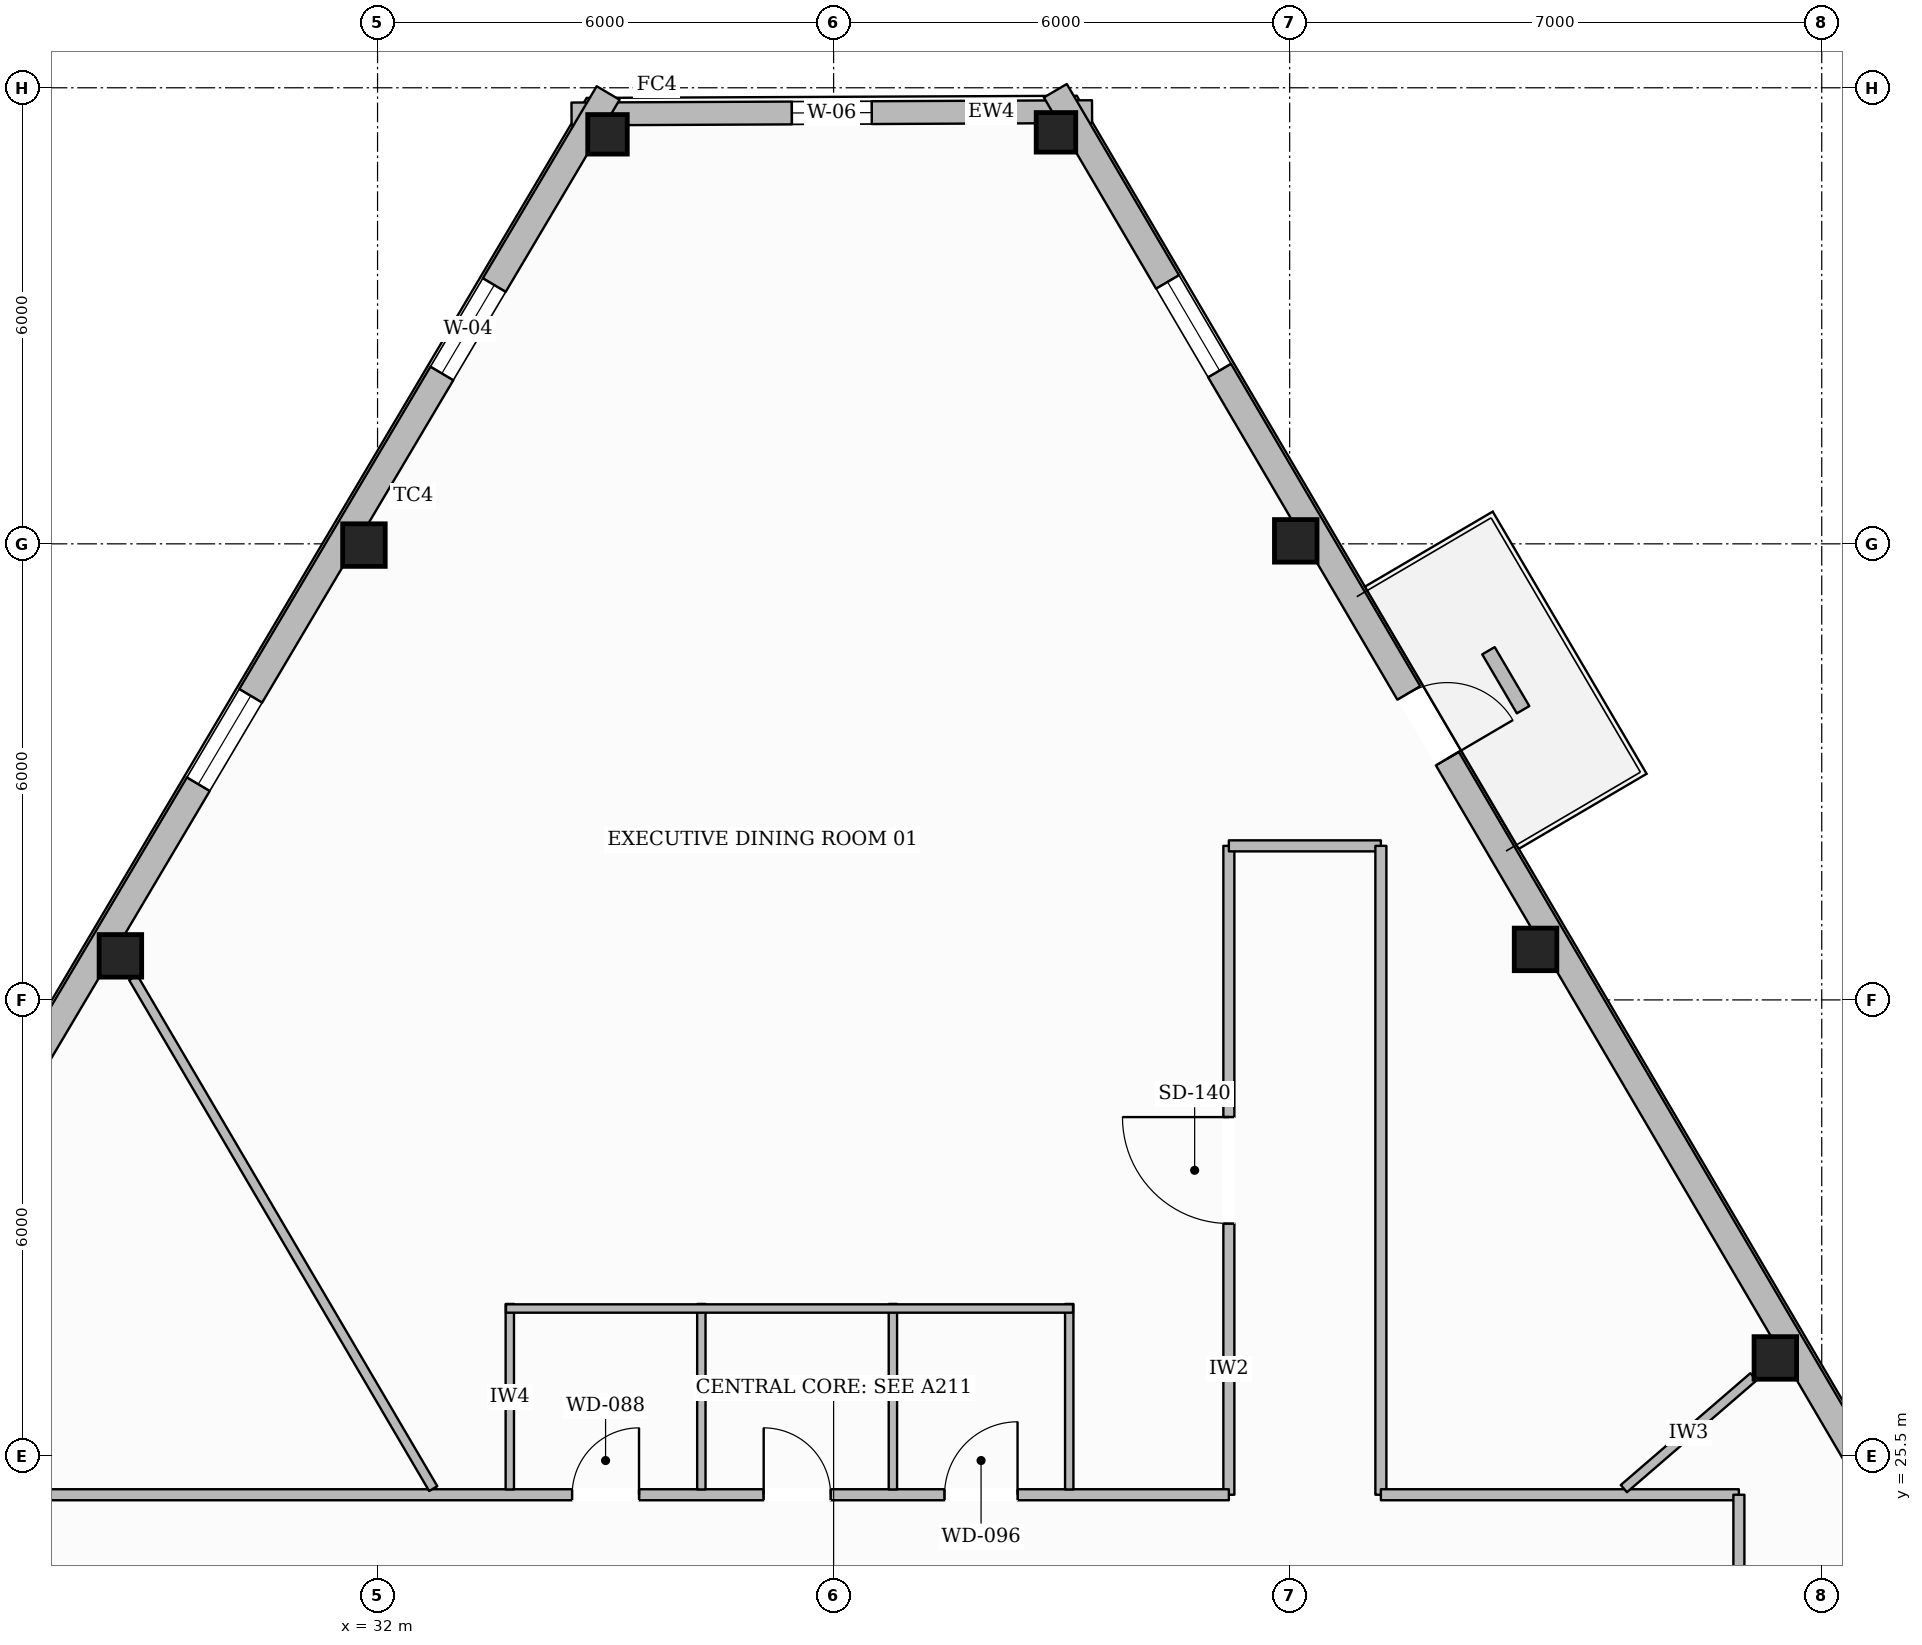
"""IFC4 building model, lengths in metres.
Left out: names, types, materials, properties, quantities, classifications, styles, units other than length and angle.
Written with IfcOpenShell. Run it as: python <this file> out.ifc"""

import sys

from ifc_helpers import new_model, si_unit, direction, frame, frame_2d, origin, origin_2d, place, context, subcontext, project, spatial, rectangle, hollow_rectangle, extrude, element, fill, save


model = new_model("IFC4")
c1 = context("Model", 3, precision=1e-05, world=origin(), true_north=direction((0.0, 1.0)))
c2 = subcontext(c1, "Body", "Model", "MODEL_VIEW")
j1 = project(units=[si_unit("LENGTHUNIT", "METRE"), si_unit("PLANEANGLEUNIT", "RADIAN")], contexts=[c1])
p1 = place(None, origin())
s1 = spatial("IfcSite", under=j1, at=p1, CompositionType="ELEMENT")
p2 = place(p1, origin())
s2 = spatial("IfcBuilding", under=s1, at=p2, CompositionType="ELEMENT")
p3 = place(p2, frame((0.0, 0.0, 278.0)))
s3 = spatial("IfcBuildingStorey", under=s2, at=p3, CompositionType="ELEMENT", Elevation=278.0)
p4 = place(p3, frame((35.025, 42.888, 0.0), z_axis=(0.0, 0.0, 1.0), x_axis=(1.0, 0.0, 0.0)))
e1 = element("IfcColumn", 1, at=p4, inside=s3, PredefinedType="COLUMN", context=c2, shape_type="SweptSolid", body=[
    extrude(hollow_rectangle(XDim=0.52, YDim=0.52, WallThickness=0.024, at=origin_2d()), origin(), (0.0, 0.0, 1.0), 3.61),
])
for number, where, z_axis, x_axis in (
    (2, (31.821, 37.484, 0.0), (0.0, 0.0, 1.0), (1.0, 0.0, 0.0)),
    (3, (28.617, 32.08, 0.0), (0.0, 0.0, 1.0), (1.0, 0.0, 0.0)),
    (4, (50.389, 26.79, 0.0), (0.0, 0.0, 1.0), (1.0, 0.0, 0.0)),
    (5, (47.235, 32.164, 0.0), (0.0, 0.0, 1.0), (1.0, 0.0, 0.0)),
    (6, (44.08, 37.539, 0.0), (0.0, 0.0, 1.0), (1.0, 0.0, 0.0)),
):
    element("IfcColumn", number, at=place(p3, frame(where, z_axis=z_axis, x_axis=x_axis)), inside=s3, PredefinedType="COLUMN", context=c2, shape_type="SweptSolid", body=[
        extrude(hollow_rectangle(XDim=0.56, YDim=0.56, WallThickness=0.025, at=origin_2d()), origin(), (0.0, 0.0, 1.0), 3.61),
    ])
p5 = place(p3, frame((40.925, 42.914, 0.0), z_axis=(0.0, 0.0, 1.0), x_axis=(1.0, 0.0, 0.0)))
e7 = element("IfcColumn", 7, at=p5, inside=s3, PredefinedType="COLUMN", context=c2, shape_type="SweptSolid", body=[
    extrude(hollow_rectangle(XDim=0.52, YDim=0.52, WallThickness=0.024, at=origin_2d()), origin(), (0.0, 0.0, 1.0), 3.61),
])
p6 = place(p3, frame((34.552, 43.156, 0.0), z_axis=(0.0, 0.0, 1.0), x_axis=(0.999990229646, 0.004420476578, 0.0)))
e8 = element("IfcWall", 8, at=p6, inside=s3, PredefinedType="STANDARD", context=c2, shape_type="SweptSolid", body=[
    extrude(rectangle(XDim=6.848, YDim=0.3, at=frame_2d((3.424, 0.0))), origin(), (0.0, 0.0, 1.0), 3.196),
])
p7 = place(p6, frame((2.899, 0.0, 0.65)))
e9 = element("IfcOpeningElement", 9, at=p7, cuts=e8, PredefinedType="OPENING", context=c2, shape_type="SweptSolid", body=[
    extrude(rectangle(XDim=1.05, YDim=1.7, at=frame_2d((0.525, 0.85))), frame((0.0, 0.16, 0.0), z_axis=(0.0, -1.0, 0.0), x_axis=(1.0, 0.0, 0.0)), (0.0, 0.0, 1.0), 0.32),
])
p8 = place(p3, frame((15.322, 10.186, 0.0), z_axis=(0.0, 0.0, 1.0), x_axis=(0.510014133956, 0.860166020699, 0.0)))
e10 = element("IfcWall", 10, at=p8, inside=s3, PredefinedType="STANDARD", context=c2, shape_type="SweptSolid", body=[
    extrude(rectangle(XDim=38.65, YDim=0.35, at=frame_2d((19.325, 0.0))), origin(), (0.0, 0.0, 1.0), 3.196),
])
p9 = place(p8, frame((34.362, 0.0, 0.65)))
e11 = element("IfcOpeningElement", 11, at=p9, cuts=e10, PredefinedType="OPENING", context=c2, shape_type="SweptSolid", body=[
    extrude(rectangle(XDim=1.35, YDim=1.75, at=frame_2d((0.675, 0.875))), frame((0.0, 0.185, 0.0), z_axis=(0.0, -1.0, 0.0), x_axis=(1.0, 0.0, 0.0)), (0.0, 0.0, 1.0), 0.37),
])
p10 = place(p8, frame((28.08, 0.0, 0.65)))
e12 = element("IfcOpeningElement", 12, at=p10, cuts=e10, PredefinedType="OPENING", context=c2, shape_type="SweptSolid", body=[
    extrude(rectangle(XDim=1.35, YDim=1.75, at=frame_2d((0.675, 0.875))), frame((0.0, 0.185, 0.0), z_axis=(0.0, -1.0, 0.0), x_axis=(1.0, 0.0, 0.0)), (0.0, 0.0, 1.0), 0.37),
])
p11 = place(p8, frame((21.797, 0.0, 0.65)))
e13 = element("IfcOpeningElement", 13, at=p11, cuts=e10, PredefinedType="OPENING", context=c2, shape_type="SweptSolid", body=[
    extrude(rectangle(XDim=1.35, YDim=1.75, at=frame_2d((0.675, 0.875))), frame((0.0, 0.185, 0.0), z_axis=(0.0, -1.0, 0.0), x_axis=(1.0, 0.0, 0.0)), (0.0, 0.0, 1.0), 0.37),
])
p12 = place(p8, frame((9.232, 0.0, 0.65)))
e14 = element("IfcOpeningElement", 14, at=p12, cuts=e10, PredefinedType="OPENING", context=c2, shape_type="SweptSolid", body=[
    extrude(rectangle(XDim=1.35, YDim=1.75, at=frame_2d((0.675, 0.875))), frame((0.0, 0.185, 0.0), z_axis=(0.0, -1.0, 0.0), x_axis=(1.0, 0.0, 0.0)), (0.0, 0.0, 1.0), 0.37),
])
p13 = place(p8, frame((2.949, 0.0, 0.65)))
e15 = element("IfcOpeningElement", 15, at=p13, cuts=e10, PredefinedType="OPENING", context=c2, shape_type="SweptSolid", body=[
    extrude(rectangle(XDim=1.35, YDim=1.75, at=frame_2d((0.675, 0.875))), frame((0.0, 0.185, 0.0), z_axis=(0.0, -1.0, 0.0), x_axis=(1.0, 0.0, 0.0)), (0.0, 0.0, 1.0), 0.37),
])
p14 = place(p3, frame((40.917, 43.461, 0.0), z_axis=(0.0, 0.0, 1.0), x_axis=(0.506204788728, -0.862413306872, 0.0)))
e16 = element("IfcWall", 16, at=p14, inside=s3, PredefinedType="STANDARD", context=c2, shape_type="SweptSolid", body=[
    extrude(rectangle(XDim=38.352, YDim=0.35, at=frame_2d((19.176, 0.0))), origin(), (0.0, 0.0, 1.0), 3.196),
])
p15 = place(p14, frame((9.188, 0.0, 0.0)))
e17 = element("IfcOpeningElement", 17, at=p15, cuts=e16, PredefinedType="OPENING", context=c2, shape_type="SweptSolid", body=[
    extrude(rectangle(XDim=1.0, YDim=2.2, at=frame_2d((0.5, 1.1))), frame((0.0, 0.185, 0.0), z_axis=(0.0, -1.0, 0.0), x_axis=(1.0, 0.0, 0.0)), (0.0, 0.0, 1.0), 0.37),
])
p16 = place(p14, frame((34.078, 0.0, 0.65)))
e18 = element("IfcOpeningElement", 18, at=p16, cuts=e16, PredefinedType="OPENING", context=c2, shape_type="SweptSolid", body=[
    extrude(rectangle(XDim=1.35, YDim=1.75, at=frame_2d((0.675, 0.875))), frame((0.0, 0.185, 0.0), z_axis=(0.0, -1.0, 0.0), x_axis=(1.0, 0.0, 0.0)), (0.0, 0.0, 1.0), 0.37),
])
p17 = place(p14, frame((27.846, 0.0, 0.65)))
e19 = element("IfcOpeningElement", 19, at=p17, cuts=e16, PredefinedType="OPENING", context=c2, shape_type="SweptSolid", body=[
    extrude(rectangle(XDim=1.35, YDim=1.75, at=frame_2d((0.675, 0.875))), frame((0.0, 0.185, 0.0), z_axis=(0.0, -1.0, 0.0), x_axis=(1.0, 0.0, 0.0)), (0.0, 0.0, 1.0), 0.37),
])
p18 = place(p14, frame((21.614, 0.0, 0.65)))
e20 = element("IfcOpeningElement", 20, at=p18, cuts=e16, PredefinedType="OPENING", context=c2, shape_type="SweptSolid", body=[
    extrude(rectangle(XDim=1.35, YDim=1.75, at=frame_2d((0.675, 0.875))), frame((0.0, 0.185, 0.0), z_axis=(0.0, -1.0, 0.0), x_axis=(1.0, 0.0, 0.0)), (0.0, 0.0, 1.0), 0.37),
])
p19 = place(p14, frame((2.917, 0.0, 0.65)))
e21 = element("IfcOpeningElement", 21, at=p19, cuts=e16, PredefinedType="OPENING", context=c2, shape_type="SweptSolid", body=[
    extrude(rectangle(XDim=1.35, YDim=1.75, at=frame_2d((0.675, 0.875))), frame((0.0, 0.185, 0.0), z_axis=(0.0, -1.0, 0.0), x_axis=(1.0, 0.0, 0.0)), (0.0, 0.0, 1.0), 0.37),
])
p20 = place(p3, frame((47.071, 35.318, 0.0), z_axis=(0.0, 0.0, 1.0), x_axis=(-0.506011920069, 0.862526484665, 0.0)))
e22 = element("IfcWall", 22, at=p20, inside=s3, PredefinedType="USERDEFINED", context=c2, shape_type="SweptSolid", body=[
    extrude(rectangle(XDim=0.9, YDim=0.19, at=frame_2d((0.45, 0.0))), origin(), (0.0, 0.0, 1.0), 0.5),
])
p21 = place(p3, frame((43.2, 24.99, 0.0), z_axis=(0.0, 0.0, 1.0), x_axis=(0.0, 1.0, 0.0)))
e23 = element("IfcWall", 23, at=p21, inside=s3, PredefinedType="PARTITIONING", context=c2, shape_type="SweptSolid", body=[
    extrude(rectangle(XDim=8.537, YDim=0.145, at=frame_2d((4.268, 0.0))), origin(), (0.0, 0.0, 1.0), 3.61),
])
p22 = place(p21, frame((3.568, 0.0, 0.0)))
e24 = element("IfcOpeningElement", 24, at=p22, cuts=e23, PredefinedType="OPENING", context=c2, shape_type="SweptSolid", body=[
    extrude(rectangle(XDim=1.4, YDim=2.2, at=frame_2d((0.7, 1.1))), frame((0.0, 0.083, 0.0), z_axis=(0.0, -1.0, 0.0), x_axis=(1.0, 0.0, 0.0)), (0.0, 0.0, 1.0), 0.165),
])
p23 = place(p3, frame((43.2, 33.527, 0.0), z_axis=(0.0, 0.0, 1.0), x_axis=(1.0, 0.0, 0.0)))
e25 = element("IfcWall", 25, at=p23, inside=s3, PredefinedType="PARTITIONING", context=c2, shape_type="SweptSolid", body=[
    extrude(rectangle(XDim=2.0, YDim=0.145, at=frame_2d((1.0, 0.0))), origin(), (0.0, 0.0, 1.0), 3.61),
])
p24 = place(p3, frame((45.2, 33.527, 0.0), z_axis=(0.0, 0.0, 1.0), x_axis=(0.0, -1.0, 0.0)))
e26 = element("IfcWall", 26, at=p24, inside=s3, PredefinedType="PARTITIONING", context=c2, shape_type="SweptSolid", body=[
    extrude(rectangle(XDim=8.537, YDim=0.145, at=frame_2d((4.268, 0.0))), origin(), (0.0, 0.0, 1.0), 3.61),
])
p25 = place(p3, frame((45.2, 24.99, 0.0), z_axis=(0.0, 0.0, 1.0), x_axis=(1.0, 0.0, 0.0)))
e27 = element("IfcWall", 27, at=p25, inside=s3, PredefinedType="PARTITIONING", context=c2, shape_type="SweptSolid", body=[
    extrude(rectangle(XDim=4.71, YDim=0.145, at=frame_2d((2.355, 0.0))), origin(), (0.0, 0.0, 1.0), 3.61),
])
p26 = place(p3, frame((49.91, 24.99, 0.0), z_axis=(0.0, 0.0, 1.0), x_axis=(0.0, -1.0, 0.0)))
e28 = element("IfcWall", 28, at=p26, inside=s3, PredefinedType="PARTITIONING", context=c2, shape_type="SweptSolid", body=[
    extrude(rectangle(XDim=7.34, YDim=0.145, at=frame_2d((3.67, 0.0))), origin(), (0.0, 0.0, 1.0), 3.349),
])
p27 = place(p26, frame((2.97, 0.0, 0.0)))
e29 = element("IfcOpeningElement", 29, at=p27, cuts=e28, PredefinedType="OPENING", context=c2, shape_type="SweptSolid", body=[
    extrude(rectangle(XDim=1.4, YDim=2.2, at=frame_2d((0.7, 1.1))), frame((0.0, 0.083, 0.0), z_axis=(0.0, -1.0, 0.0), x_axis=(1.0, 0.0, 0.0)), (0.0, 0.0, 1.0), 0.165),
])
p28 = place(p3, frame((26.09, 24.99, 0.0), z_axis=(0.0, 0.0, 1.0), x_axis=(1.0, 0.0, 0.0)))
e30 = element("IfcWall", 30, at=p28, inside=s3, PredefinedType="PARTITIONING", context=c2, shape_type="SweptSolid", body=[
    extrude(rectangle(XDim=17.11, YDim=0.145, at=frame_2d((8.555, 0.0))), origin(), (0.0, 0.0, 1.0), 3.61),
])
p29 = place(p28, frame((8.47, 0.0, 0.0)))
e31 = element("IfcOpeningElement", 31, at=p29, cuts=e30, PredefinedType="OPENING", context=c2, shape_type="SweptSolid", body=[
    extrude(rectangle(XDim=0.88, YDim=2.1, at=frame_2d((0.44, 1.05))), frame((0.0, 0.083, 0.0), z_axis=(0.0, -1.0, 0.0), x_axis=(1.0, 0.0, 0.0)), (0.0, 0.0, 1.0), 0.165),
])
p30 = place(p28, frame((10.99, 0.0, 0.0)))
e32 = element("IfcOpeningElement", 32, at=p30, cuts=e30, PredefinedType="OPENING", context=c2, shape_type="SweptSolid", body=[
    extrude(rectangle(XDim=0.88, YDim=2.1, at=frame_2d((0.44, 1.05))), frame((0.0, 0.083, 0.0), z_axis=(0.0, -1.0, 0.0), x_axis=(1.0, 0.0, 0.0)), (0.0, 0.0, 1.0), 0.165),
])
p31 = place(p28, frame((13.37, 0.0, 0.0)))
e33 = element("IfcOpeningElement", 33, at=p31, cuts=e30, PredefinedType="OPENING", context=c2, shape_type="SweptSolid", body=[
    extrude(rectangle(XDim=0.96, YDim=2.1, at=frame_2d((0.48, 1.05))), frame((0.0, 0.083, 0.0), z_axis=(0.0, -1.0, 0.0), x_axis=(1.0, 0.0, 0.0)), (0.0, 0.0, 1.0), 0.165),
])
for number, where, z_axis, x_axis in (
    (34, (33.74, 25.06, 0.0), (0.0, 0.0, 1.0), (0.0, 1.0, 0.0)),
    (35, (36.26, 25.06, 0.0), (0.0, 0.0, 1.0), (0.0, 1.0, 0.0)),
    (36, (38.78, 25.06, 0.0), (0.0, 0.0, 1.0), (0.0, 1.0, 0.0)),
    (37, (41.1, 25.06, 0.0), (0.0, 0.0, 1.0), (0.0, 1.0, 0.0)),
):
    element("IfcWall", number, at=place(p3, frame(where, z_axis=z_axis, x_axis=x_axis)), inside=s3, PredefinedType="PLUMBINGWALL", context=c2, shape_type="SweptSolid", body=[
        extrude(rectangle(XDim=2.44, YDim=0.11, at=frame_2d((1.22, 0.0))), origin(), (0.0, 0.0, 1.0), 3.61),
    ])
p32 = place(p3, frame((33.69, 27.44, 0.0), z_axis=(0.0, 0.0, 1.0), x_axis=(1.0, 0.0, 0.0)))
e38 = element("IfcWall", 38, at=p32, inside=s3, PredefinedType="PLUMBINGWALL", context=c2, shape_type="SweptSolid", body=[
    extrude(rectangle(XDim=7.46, YDim=0.11, at=frame_2d((3.73, 0.0))), origin(), (0.0, 0.0, 1.0), 3.61),
])
p33 = place(p3, frame((48.397, 25.071, 0.0), z_axis=(0.0, 0.0, 1.0), x_axis=(0.7571861728, 0.653199127158, 0.0)))
e39 = element("IfcWall", 39, at=p33, inside=s3, PredefinedType="PARTITIONING", context=c2, shape_type="SweptSolid", body=[
    extrude(rectangle(XDim=2.251, YDim=0.125, at=frame_2d((1.126, 0.0))), origin(), (0.0, 0.0, 1.0), 3.61),
])
p34 = place(p3, frame((32.733, 25.071, 0.0), z_axis=(0.0, 0.0, 1.0), x_axis=(-0.506379339837, 0.862310828058, 0.0)))
e40 = element("IfcWall", 40, at=p34, inside=s3, PredefinedType="PARTITIONING", context=c2, shape_type="SweptSolid", body=[
    extrude(rectangle(XDim=7.794, YDim=0.125, at=frame_2d((3.897, 0.0))), origin(), (0.0, 0.0, 1.0), 3.246),
])
p35 = place(p15, origin())
e41 = element("IfcDoor", 41, at=p35, inside=s3, OperationType="SINGLE_SWING_RIGHT", PredefinedType="DOOR", context=c2, shape_type="SweptSolid", body=[
    extrude(rectangle(XDim=1.0, YDim=2.2, at=frame_2d((0.5, 1.1))), frame((0.0, 0.025, 0.0), z_axis=(0.0, -1.0, 0.0), x_axis=(1.0, 0.0, 0.0)), (0.0, 0.0, 1.0), 0.05),
])
fill(e17, e41)
p36 = place(p9, origin())
e42 = element("IfcWindow", 42, at=p36, inside=s3, PartitioningType="SINGLE_PANEL", PredefinedType="WINDOW", context=c2, shape_type="SweptSolid", body=[
    extrude(rectangle(XDim=1.35, YDim=1.75, at=frame_2d((0.675, 0.875))), frame((0.0, 0.03, 0.0), z_axis=(0.0, -1.0, 0.0), x_axis=(1.0, 0.0, 0.0)), (0.0, 0.0, 1.0), 0.06),
])
fill(e11, e42)
p37 = place(p10, origin())
e43 = element("IfcWindow", 43, at=p37, inside=s3, PartitioningType="SINGLE_PANEL", PredefinedType="WINDOW", context=c2, shape_type="SweptSolid", body=[
    extrude(rectangle(XDim=1.35, YDim=1.75, at=frame_2d((0.675, 0.875))), frame((0.0, 0.03, 0.0), z_axis=(0.0, -1.0, 0.0), x_axis=(1.0, 0.0, 0.0)), (0.0, 0.0, 1.0), 0.06),
])
fill(e12, e43)
p38 = place(p19, origin())
e44 = element("IfcWindow", 44, at=p38, inside=s3, PartitioningType="SINGLE_PANEL", PredefinedType="WINDOW", context=c2, shape_type="SweptSolid", body=[
    extrude(rectangle(XDim=1.35, YDim=1.75, at=frame_2d((0.675, 0.875))), frame((0.0, 0.03, 0.0), z_axis=(0.0, -1.0, 0.0), x_axis=(1.0, 0.0, 0.0)), (0.0, 0.0, 1.0), 0.06),
])
fill(e21, e44)
p39 = place(p7, origin())
e45 = element("IfcWindow", 45, at=p39, inside=s3, PartitioningType="SINGLE_PANEL", PredefinedType="WINDOW", context=c2, shape_type="SweptSolid", body=[
    extrude(rectangle(XDim=1.05, YDim=1.7, at=frame_2d((0.525, 0.85))), frame((0.0, 0.03, 0.0), z_axis=(0.0, -1.0, 0.0), x_axis=(1.0, 0.0, 0.0)), (0.0, 0.0, 1.0), 0.06),
])
fill(e9, e45)
p40 = place(p29, origin())
e46 = element("IfcDoor", 46, at=p40, inside=s3, OperationType="SINGLE_SWING_RIGHT", PredefinedType="DOOR", context=c2, shape_type="SweptSolid", body=[
    extrude(rectangle(XDim=0.88, YDim=2.1, at=frame_2d((0.44, 1.05))), frame((0.0, 0.025, 0.0), z_axis=(0.0, -1.0, 0.0), x_axis=(1.0, 0.0, 0.0)), (0.0, 0.0, 1.0), 0.05),
])
fill(e31, e46)
p41 = place(p30, origin())
e47 = element("IfcDoor", 47, at=p41, inside=s3, OperationType="SINGLE_SWING_LEFT", PredefinedType="DOOR", context=c2, shape_type="SweptSolid", body=[
    extrude(rectangle(XDim=0.88, YDim=2.1, at=frame_2d((0.44, 1.05))), frame((0.0, 0.025, 0.0), z_axis=(0.0, -1.0, 0.0), x_axis=(1.0, 0.0, 0.0)), (0.0, 0.0, 1.0), 0.05),
])
fill(e32, e47)
p42 = place(p31, origin())
e48 = element("IfcDoor", 48, at=p42, inside=s3, OperationType="SINGLE_SWING_RIGHT", PredefinedType="DOOR", context=c2, shape_type="SweptSolid", body=[
    extrude(rectangle(XDim=0.96, YDim=2.1, at=frame_2d((0.48, 1.05))), frame((0.0, 0.025, 0.0), z_axis=(0.0, -1.0, 0.0), x_axis=(1.0, 0.0, 0.0)), (0.0, 0.0, 1.0), 0.05),
])
fill(e33, e48)
p43 = place(p22, origin())
e49 = element("IfcDoor", 49, at=p43, inside=s3, OperationType="SINGLE_SWING_RIGHT", PredefinedType="DOOR", context=c2, shape_type="SweptSolid", body=[
    extrude(rectangle(XDim=1.4, YDim=2.2, at=frame_2d((0.7, 1.1))), frame((0.0, 0.025, 0.0), z_axis=(0.0, -1.0, 0.0), x_axis=(1.0, 0.0, 0.0)), (0.0, 0.0, 1.0), 0.05),
])
fill(e24, e49)
save(model, sys.argv[1])
